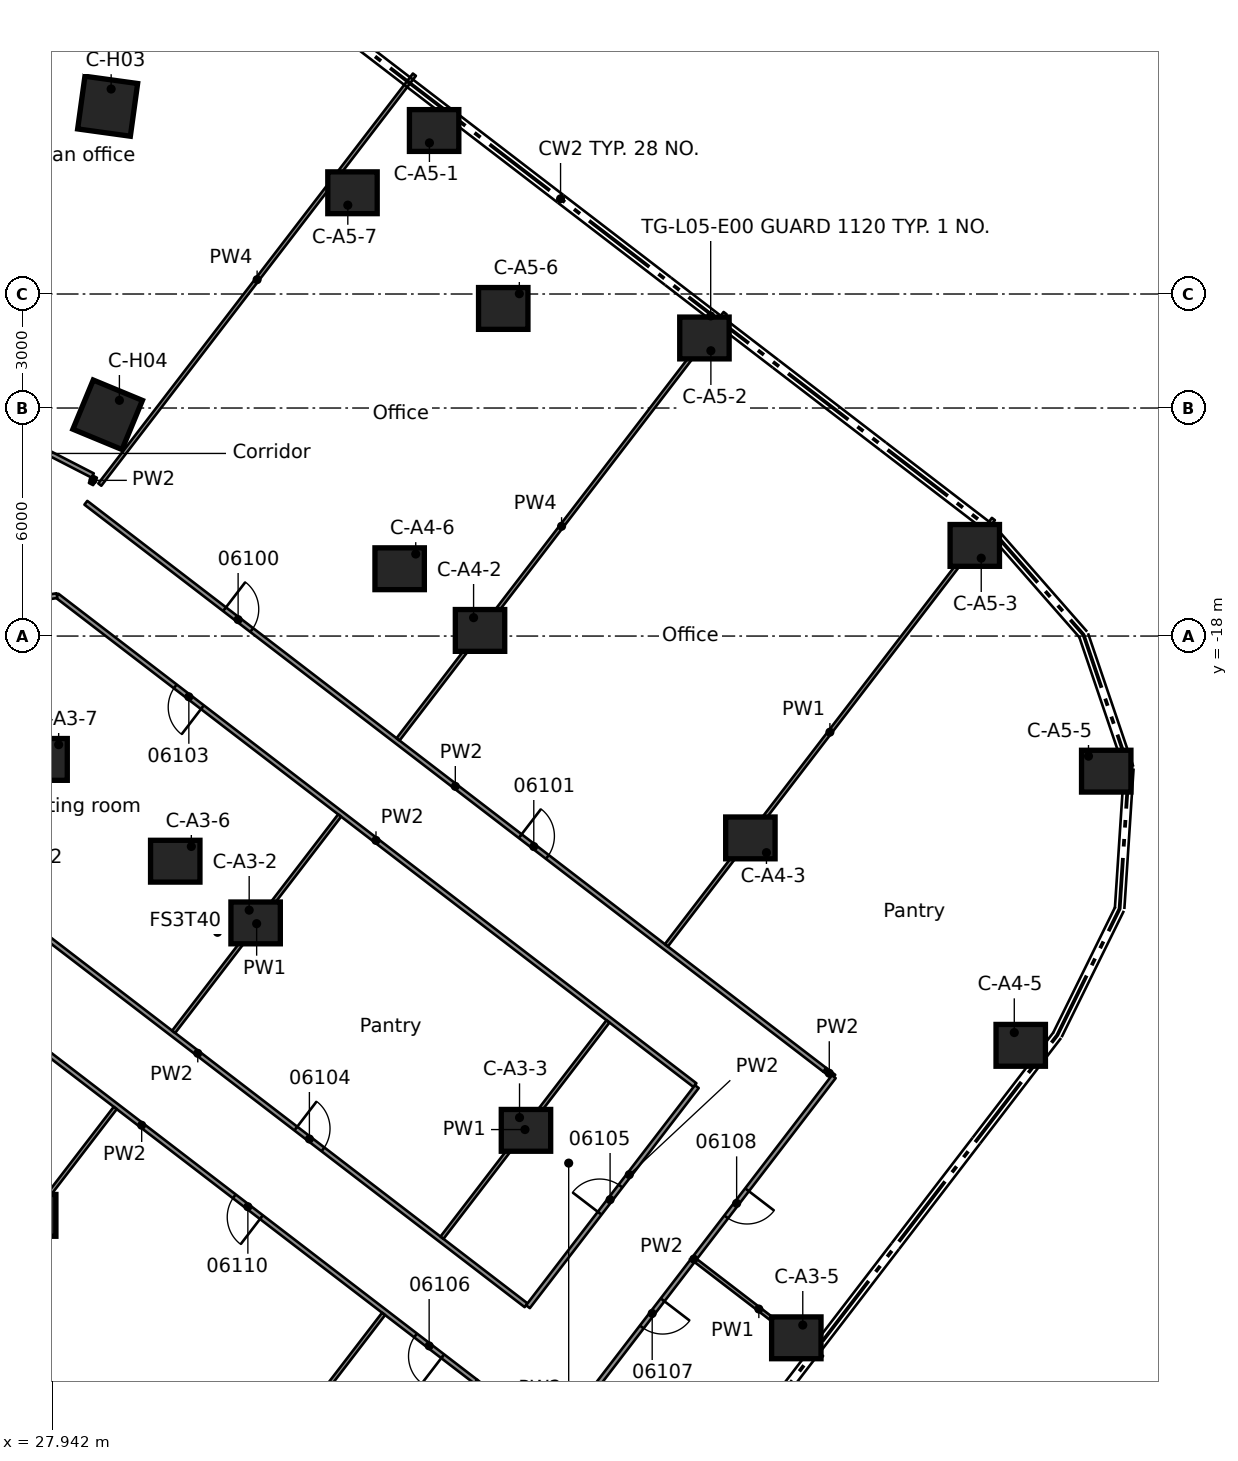
"""IFC4 building model, lengths in metres.
Left out: names, types, materials, properties, quantities, classifications, styles, units other than length and angle.
Written with IfcOpenShell. Run it as: python <this file> out.ifc"""

import sys

from ifc_helpers import new_model, si_unit, direction, frame, frame_2d, origin, origin_2d, place, context, subcontext, project, spatial, rectangle, extrude, element, fill, save


model = new_model("IFC4")
c1 = context("Model", 3, precision=1e-05, world=origin(), true_north=direction((0.0, 1.0)))
c2 = subcontext(c1, "Body", "Model", "MODEL_VIEW")
j1 = project(units=[si_unit("LENGTHUNIT", "METRE"), si_unit("PLANEANGLEUNIT", "RADIAN")], contexts=[c1])
p1 = place(None, origin())
s1 = spatial("IfcSite", under=j1, at=p1, CompositionType="ELEMENT")
p2 = place(p1, origin())
s2 = spatial("IfcBuilding", under=s1, at=p2, CompositionType="ELEMENT")
p3 = place(p2, frame((0.0, 0.0, 29.2)))
s3 = spatial("IfcBuildingStorey", under=s2, at=p3, CompositionType="ELEMENT", Elevation=29.2)
for number, where, z_axis, x_axis in (
    (1, (27.389, -33.243, 0.0), (0.0, 0.0, 1.0), (1.0, 0.0, 0.0)),
    (2, (33.294, -25.548, 0.0), (0.0, 0.0, 1.0), (1.0, 0.0, 0.0)),
    (3, (40.408, -31.006, 0.0), (0.0, 0.0, 1.0), (1.0, 0.0, 0.0)),
    (4, (47.522, -36.465, 0.0), (0.0, 0.0, 1.0), (1.0, 0.0, 0.0)),
    (5, (31.179, -23.924, 0.0), (0.0, 0.0, 1.0), (1.0, 0.0, 0.0)),
    (6, (27.688, -21.246, 0.0), (0.0, 0.0, 1.0), (1.0, 0.0, 0.0)),
    (7, (39.199, -17.852, 0.0), (0.0, 0.0, 1.0), (1.0, 0.0, 0.0)),
    (8, (46.313, -23.311, 0.0), (0.0, 0.0, 1.0), (1.0, 0.0, 0.0)),
    (9, (53.427, -28.769, 0.0), (0.0, 0.0, 1.0), (1.0, 0.0, 0.0)),
    (10, (37.084, -16.229, 0.0), (0.0, 0.0, 1.0), (1.0, 0.0, 0.0)),
    (11, (37.991, -4.698, 0.0), (0.0, 0.0, 1.0), (1.0, 0.0, 0.0)),
    (12, (45.104, -10.157, 0.0), (0.0, 0.0, 1.0), (1.0, 0.0, 0.0)),
    (13, (52.218, -15.615, 0.0), (0.0, 0.0, 1.0), (1.0, 0.0, 0.0)),
    (14, (55.677, -21.555, 0.0), (0.0, 0.0, 1.0), (1.0, 0.0, 0.0)),
    (15, (39.81, -9.38, 0.0), (0.0, 0.0, 1.0), (1.0, 0.0, 0.0)),
    (16, (35.843, -6.336, 0.0), (0.0, 0.0, 1.0), (1.0, 0.0, 0.0)),
):
    element("IfcColumn", number, at=place(p3, frame(where, z_axis=z_axis, x_axis=x_axis)), inside=s3, PredefinedType="COLUMN", context=c2, shape_type="SweptSolid", body=[
        extrude(rectangle(XDim=1.3, YDim=1.1, at=origin_2d()), origin(), (0.0, 0.0, 1.0), 4.1),
    ])
for number, where, z_axis, x_axis in (
    (17, (29.4, -4.059, 0.0), (0.0, 0.0, 1.0), (0.991, -0.137, 0.0)),
    (18, (29.4, -12.178, 0.0), (0.0, 0.0, 1.0), (0.924, -0.383, 0.0)),
):
    element("IfcColumn", number, at=place(p3, frame(where, z_axis=z_axis, x_axis=x_axis)), inside=s3, PredefinedType="COLUMN", context=c2, shape_type="SweptSolid", body=[
        extrude(rectangle(XDim=1.4, YDim=1.4, at=origin_2d()), origin(), (0.0, 0.0, 1.0), 4.1),
    ])
p4 = place(p3, frame((48.27, -29.412, 0.0), z_axis=(0.0, 0.0, 1.0), x_axis=(0.793016893484, -0.609199644328, 0.0)))
e19 = element("IfcWall", 19, at=p4, inside=s3, PredefinedType="PARTITIONING", context=c2, shape_type="SweptSolid", body=[
    extrude(rectangle(XDim=0.3, YDim=0.125, at=frame_2d((0.15, 0.0))), origin(), (0.0, 0.0, 1.0), 3.66),
])
p5 = place(p3, frame((39.09, -37.62, 0.0), z_axis=(0.0, 0.0, 1.0), x_axis=(-0.793364364442, 0.608747061786, 0.0)))
e20 = element("IfcWall", 20, at=p5, inside=s3, PredefinedType="PARTITIONING", context=c2, shape_type="SweptSolid", body=[
    extrude(rectangle(XDim=22.17, YDim=0.125, at=frame_2d((11.085, 0.0))), origin(), (0.0, 0.0, 1.0), 3.66),
])
p6 = place(p5, frame((1.1, 0.0, 0.0)))
e21 = element("IfcOpeningElement", 21, at=p6, cuts=e20, PredefinedType="OPENING", context=c2, shape_type="SweptSolid", body=[
    extrude(rectangle(XDim=0.9, YDim=2.1, at=frame_2d((0.45, 1.05))), frame((0.0, 0.073, 0.0), z_axis=(0.0, -1.0, 0.0), x_axis=(1.0, 0.0, 0.0)), (0.0, 0.0, 1.0), 0.145),
])
p7 = place(p5, frame((16.263, 0.0, 0.0)))
e22 = element("IfcOpeningElement", 22, at=p7, cuts=e20, PredefinedType="OPENING", context=c2, shape_type="SweptSolid", body=[
    extrude(rectangle(XDim=1.8, YDim=2.1, at=frame_2d((0.9, 1.05))), frame((0.0, 0.073, 0.0), z_axis=(0.0, -1.0, 0.0), x_axis=(1.0, 0.0, 0.0)), (0.0, 0.0, 1.0), 0.145),
])
p8 = place(p5, frame((7.113, 0.0, 0.0)))
e23 = element("IfcOpeningElement", 23, at=p8, cuts=e20, PredefinedType="OPENING", context=c2, shape_type="SweptSolid", body=[
    extrude(rectangle(XDim=0.9, YDim=2.1, at=frame_2d((0.45, 1.05))), frame((0.0, 0.073, 0.0), z_axis=(0.0, -1.0, 0.0), x_axis=(1.0, 0.0, 0.0)), (0.0, 0.0, 1.0), 0.145),
])
p9 = place(p3, frame((39.089, -37.62, 0.0), z_axis=(0.0, 0.0, 1.0), x_axis=(0.793216962218, -0.608939119166, 0.0)))
e24 = element("IfcWall", 24, at=p9, inside=s3, PredefinedType="PARTITIONING", context=c2, shape_type="SweptSolid", body=[
    extrude(rectangle(XDim=2.524, YDim=0.125, at=frame_2d((1.262, 0.0))), origin(), (0.0, 0.0, 1.0), 3.66),
])
p10 = place(p3, frame((23.132, -22.35, 0.0), z_axis=(0.0, 0.0, 1.0), x_axis=(0.79336850047, -0.60874167137, 0.0)))
e25 = element("IfcWall", 25, at=p10, inside=s3, PredefinedType="PARTITIONING", context=c2, shape_type="SweptSolid", body=[
    extrude(rectangle(XDim=21.779, YDim=0.125, at=frame_2d((10.89, 0.0))), origin(), (0.0, 0.0, 1.0), 3.66),
])
p11 = place(p10, frame((4.6, 0.0, 0.0)))
e26 = element("IfcOpeningElement", 26, at=p11, cuts=e25, PredefinedType="OPENING", context=c2, shape_type="SweptSolid", body=[
    extrude(rectangle(XDim=0.9, YDim=2.1, at=frame_2d((0.45, 1.05))), frame((0.0, 0.073, 0.0), z_axis=(0.0, -1.0, 0.0), x_axis=(1.0, 0.0, 0.0)), (0.0, 0.0, 1.0), 0.145),
])
p12 = place(p10, frame((14.142, 0.0, 0.0)))
e27 = element("IfcOpeningElement", 27, at=p12, cuts=e25, PredefinedType="OPENING", context=c2, shape_type="SweptSolid", body=[
    extrude(rectangle(XDim=0.9, YDim=2.1, at=frame_2d((0.45, 1.05))), frame((0.0, 0.073, 0.0), z_axis=(0.0, -1.0, 0.0), x_axis=(1.0, 0.0, 0.0)), (0.0, 0.0, 1.0), 0.145),
])
p13 = place(p3, frame((44.875, -34.433, 0.0), z_axis=(0.0, 0.0, 1.0), x_axis=(0.793295570217, -0.60883670904, 0.0)))
e28 = element("IfcWall", 28, at=p13, inside=s3, PredefinedType="PARTITIONING", context=c2, shape_type="SweptSolid", body=[
    extrude(rectangle(XDim=4.186, YDim=0.1, at=frame_2d((2.093, 0.0))), origin(), (0.0, 0.0, 1.0), 3.66),
])
p14 = place(p3, frame((44.855, -29.817, 0.0), z_axis=(0.0, 0.0, 1.0), x_axis=(-0.793378264443, 0.608728945844, 0.0)))
e29 = element("IfcWall", 29, at=p14, inside=s3, PredefinedType="PARTITIONING", context=c2, shape_type="SweptSolid", body=[
    extrude(rectangle(XDim=21.16, YDim=0.125, at=frame_2d((10.58, 0.0))), origin(), (0.0, 0.0, 1.0), 3.66),
])
p15 = place(p14, frame((16.337, 0.0, 0.0)))
e30 = element("IfcOpeningElement", 30, at=p15, cuts=e29, PredefinedType="OPENING", context=c2, shape_type="SweptSolid", body=[
    extrude(rectangle(XDim=0.9, YDim=2.1, at=frame_2d((0.45, 1.05))), frame((0.0, 0.073, 0.0), z_axis=(0.0, -1.0, 0.0), x_axis=(1.0, 0.0, 0.0)), (0.0, 0.0, 1.0), 0.145),
])
p16 = place(p3, frame((28.827, -14.493, 0.0), z_axis=(0.0, 0.0, 1.0), x_axis=(0.793315591759, -0.608810620695, 0.0)))
e31 = element("IfcWall", 31, at=p16, inside=s3, PredefinedType="PARTITIONING", context=c2, shape_type="SweptSolid", body=[
    extrude(rectangle(XDim=24.509, YDim=0.125, at=frame_2d((12.254, 0.0))), origin(), (0.0, 0.0, 1.0), 3.66),
])
p17 = place(p16, frame((4.6, 0.0, 0.0)))
e32 = element("IfcOpeningElement", 32, at=p17, cuts=e31, PredefinedType="OPENING", context=c2, shape_type="SweptSolid", body=[
    extrude(rectangle(XDim=0.9, YDim=2.1, at=frame_2d((0.45, 1.05))), frame((0.0, 0.073, 0.0), z_axis=(0.0, -1.0, 0.0), x_axis=(1.0, 0.0, 0.0)), (0.0, 0.0, 1.0), 0.145),
])
p18 = place(p16, frame((14.407, 0.0, 0.0)))
e33 = element("IfcOpeningElement", 33, at=p18, cuts=e31, PredefinedType="OPENING", context=c2, shape_type="SweptSolid", body=[
    extrude(rectangle(XDim=0.9, YDim=2.1, at=frame_2d((0.45, 1.05))), frame((0.0, 0.073, 0.0), z_axis=(0.0, -1.0, 0.0), x_axis=(1.0, 0.0, 0.0)), (0.0, 0.0, 1.0), 0.145),
])
p19 = place(p3, frame((21.541, -9.94, 0.0), z_axis=(0.0, 0.0, 1.0), x_axis=(0.889469569246, -0.456994404107, 0.0)))
e34 = element("IfcWall", 34, at=p19, inside=s3, PredefinedType="PARTITIONING", context=c2, shape_type="SweptSolid", body=[
    extrude(rectangle(XDim=8.394, YDim=0.125, at=frame_2d((4.197, 0.0))), origin(), (0.0, 0.0, 1.0), 3.66),
])
p20 = place(p3, frame((48.508, -29.595, 0.0), z_axis=(0.0, 0.0, 1.0), x_axis=(-0.608738166201, -0.793371189929, 0.0)))
e35 = element("IfcWall", 35, at=p20, inside=s3, PredefinedType="PARTITIONING", context=c2, shape_type="SweptSolid", body=[
    extrude(rectangle(XDim=12.1, YDim=0.125, at=frame_2d((6.05, 0.0))), origin(), (0.0, 0.0, 1.0), 3.66),
])
p21 = place(p20, frame((7.4, 0.0, 0.0)))
e36 = element("IfcOpeningElement", 36, at=p21, cuts=e35, PredefinedType="OPENING", context=c2, shape_type="SweptSolid", body=[
    extrude(rectangle(XDim=0.9, YDim=2.1, at=frame_2d((0.45, 1.05))), frame((0.0, 0.073, 0.0), z_axis=(0.0, -1.0, 0.0), x_axis=(1.0, 0.0, 0.0)), (0.0, 0.0, 1.0), 0.145),
])
p22 = place(p20, frame((3.75, 0.0, 0.0)))
e37 = element("IfcOpeningElement", 37, at=p22, cuts=e35, PredefinedType="OPENING", context=c2, shape_type="SweptSolid", body=[
    extrude(rectangle(XDim=0.9, YDim=2.1, at=frame_2d((0.45, 1.05))), frame((0.0, 0.073, 0.0), z_axis=(0.0, -1.0, 0.0), x_axis=(1.0, 0.0, 0.0)), (0.0, 0.0, 1.0), 0.145),
])
p23 = place(p3, frame((40.46, -35.646, 0.0), z_axis=(0.0, 0.0, 1.0), x_axis=(0.608868228501, 0.793271378736, 0.0)))
e38 = element("IfcWall", 38, at=p23, inside=s3, PredefinedType="PARTITIONING", context=c2, shape_type="SweptSolid", body=[
    extrude(rectangle(XDim=7.299, YDim=0.125, at=frame_2d((3.649, 0.0))), origin(), (0.0, 0.0, 1.0), 3.66),
])
p24 = place(p23, frame((3.1, 0.0, 0.0)))
e39 = element("IfcOpeningElement", 39, at=p24, cuts=e38, PredefinedType="OPENING", context=c2, shape_type="SweptSolid", body=[
    extrude(rectangle(XDim=0.9, YDim=2.1, at=frame_2d((0.45, 1.05))), frame((0.0, 0.073, 0.0), z_axis=(0.0, -1.0, 0.0), x_axis=(1.0, 0.0, 0.0)), (0.0, 0.0, 1.0), 0.145),
])
p25 = place(p3, frame((28.054, -47.051, 0.0), z_axis=(0.0, 0.0, 1.0), x_axis=(0.608819037892, 0.793309132117, 0.0)))
e40 = element("IfcWall", 40, at=p25, inside=s3, PredefinedType="PARTITIONING", context=c2, shape_type="SweptSolid", body=[
    extrude(rectangle(XDim=14.137, YDim=0.1, at=frame_2d((7.069, 0.0))), origin(), (0.0, 0.0, 1.0), 3.66),
])
p26 = place(p3, frame((38.198, -33.831, 0.0), z_axis=(0.0, 0.0, 1.0), x_axis=(0.60875801413, 0.793355960608, 0.0)))
e41 = element("IfcWall", 41, at=p26, inside=s3, PredefinedType="PARTITIONING", context=c2, shape_type="SweptSolid", body=[
    extrude(rectangle(XDim=7.174, YDim=0.1, at=frame_2d((3.587, 0.0))), origin(), (0.0, 0.0, 1.0), 3.66),
])
p27 = place(p3, frame((44.103, -26.136, 0.0), z_axis=(0.0, 0.0, 1.0), x_axis=(0.608732079898, 0.793375859793, 0.0)))
e42 = element("IfcWall", 42, at=p27, inside=s3, PredefinedType="PARTITIONING", context=c2, shape_type="SweptSolid", body=[
    extrude(rectangle(XDim=14.136, YDim=0.1, at=frame_2d((7.068, 0.0))), origin(), (0.0, 0.0, 1.0), 3.66),
])
p28 = place(p3, frame((20.993, -41.633, 0.0), z_axis=(0.0, 0.0, 1.0), x_axis=(0.608829906099, 0.793300791277, 0.0)))
e43 = element("IfcWall", 43, at=p28, inside=s3, PredefinedType="PARTITIONING", context=c2, shape_type="SweptSolid", body=[
    extrude(rectangle(XDim=14.137, YDim=0.1, at=frame_2d((7.069, 0.0))), origin(), (0.0, 0.0, 1.0), 3.66),
])
p29 = place(p3, frame((31.137, -28.413, 0.0), z_axis=(0.0, 0.0, 1.0), x_axis=(0.608843688194, 0.793290213822, 0.0)))
e44 = element("IfcWall", 44, at=p29, inside=s3, PredefinedType="PARTITIONING", context=c2, shape_type="SweptSolid", body=[
    extrude(rectangle(XDim=7.174, YDim=0.1, at=frame_2d((3.587, 0.0))), origin(), (0.0, 0.0, 1.0), 3.66),
])
p30 = place(p3, frame((37.042, -20.718, 0.0), z_axis=(0.0, 0.0, 1.0), x_axis=(0.608775561638, 0.793342495743, 0.0)))
e45 = element("IfcWall", 45, at=p30, inside=s3, PredefinedType="PARTITIONING", context=c2, shape_type="SweptSolid", body=[
    extrude(rectangle(XDim=14.136, YDim=0.1, at=frame_2d((7.068, 0.0))), origin(), (0.0, 0.0, 1.0), 3.025),
])
p31 = place(p3, frame((29.194, -14.015, 0.0), z_axis=(0.0, 0.0, 1.0), x_axis=(0.608832188233, 0.793299039815, 0.0)))
e46 = element("IfcWall", 46, at=p31, inside=s3, PredefinedType="PARTITIONING", context=c2, shape_type="SweptSolid", body=[
    extrude(rectangle(XDim=13.596, YDim=0.1, at=frame_2d((6.798, 0.0))), origin(), (0.0, 0.0, 1.0), 3.025),
])
p32 = place(p3, frame((28.962, -14.0, 0.0), z_axis=(0.0, 0.0, 1.0), x_axis=(0.458358127557, 0.8887675888, 0.0)))
e47 = element("IfcWall", 47, at=p32, inside=s3, PredefinedType="PARTITIONING", context=c2, shape_type="SweptSolid", body=[
    extrude(rectangle(XDim=0.218, YDim=0.125, at=frame_2d((0.109, 0.0))), origin(), (0.0, 0.0, 1.0), 3.66),
])
p33 = place(p3, frame((27.132, -17.087, 0.0), z_axis=(0.0, 0.0, 1.0), x_axis=(0.987224118301, 0.159337817997, 0.0)))
e48 = element("IfcWall", 48, at=p33, inside=s3, PredefinedType="PARTITIONING", context=c2, shape_type="SweptSolid", body=[
    extrude(rectangle(XDim=0.947, YDim=0.125, at=frame_2d((0.474, 0.0))), origin(), (0.0, 0.0, 1.0), 3.66),
])
p34 = place(p17, origin())
e49 = element("IfcDoor", 49, at=p34, inside=s3, OperationType="SINGLE_SWING_LEFT", PredefinedType="DOOR", context=c2, shape_type="SweptSolid", body=[
    extrude(rectangle(XDim=0.9, YDim=2.1, at=frame_2d((0.45, 1.05))), frame((0.0, 0.025, 0.0), z_axis=(0.0, -1.0, 0.0), x_axis=(1.0, 0.0, 0.0)), (0.0, 0.0, 1.0), 0.05),
])
fill(e32, e49)
p35 = place(p18, origin())
e50 = element("IfcDoor", 50, at=p35, inside=s3, OperationType="SINGLE_SWING_RIGHT", PredefinedType="DOOR", context=c2, shape_type="SweptSolid", body=[
    extrude(rectangle(XDim=0.9, YDim=2.1, at=frame_2d((0.45, 1.05))), frame((0.0, 0.025, 0.0), z_axis=(0.0, -1.0, 0.0), x_axis=(1.0, 0.0, 0.0)), (0.0, 0.0, 1.0), 0.05),
])
fill(e33, e50)
p36 = place(p15, origin())
e51 = element("IfcDoor", 51, at=p36, inside=s3, OperationType="SINGLE_SWING_RIGHT", PredefinedType="DOOR", context=c2, shape_type="SweptSolid", body=[
    extrude(rectangle(XDim=0.9, YDim=2.1, at=frame_2d((0.45, 1.05))), frame((0.0, 0.025, 0.0), z_axis=(0.0, -1.0, 0.0), x_axis=(1.0, 0.0, 0.0)), (0.0, 0.0, 1.0), 0.05),
])
fill(e30, e51)
p37 = place(p12, origin())
e52 = element("IfcDoor", 52, at=p37, inside=s3, OperationType="SINGLE_SWING_RIGHT", PredefinedType="DOOR", context=c2, shape_type="SweptSolid", body=[
    extrude(rectangle(XDim=0.9, YDim=2.1, at=frame_2d((0.45, 1.05))), frame((0.0, 0.025, 0.0), z_axis=(0.0, -1.0, 0.0), x_axis=(1.0, 0.0, 0.0)), (0.0, 0.0, 1.0), 0.05),
])
fill(e27, e52)
p38 = place(p24, origin())
e53 = element("IfcDoor", 53, at=p38, inside=s3, OperationType="SINGLE_SWING_LEFT", PredefinedType="DOOR", context=c2, shape_type="SweptSolid", body=[
    extrude(rectangle(XDim=0.9, YDim=2.1, at=frame_2d((0.45, 1.05))), frame((0.0, 0.025, 0.0), z_axis=(0.0, -1.0, 0.0), x_axis=(1.0, 0.0, 0.0)), (0.0, 0.0, 1.0), 0.05),
])
fill(e39, e53)
p39 = place(p6, origin())
e54 = element("IfcDoor", 54, at=p39, inside=s3, OperationType="SINGLE_SWING_LEFT", PredefinedType="DOOR", context=c2, shape_type="SweptSolid", body=[
    extrude(rectangle(XDim=0.9, YDim=2.1, at=frame_2d((0.45, 1.05))), frame((0.0, 0.025, 0.0), z_axis=(0.0, -1.0, 0.0), x_axis=(1.0, 0.0, 0.0)), (0.0, 0.0, 1.0), 0.05),
])
fill(e21, e54)
p40 = place(p21, origin())
e55 = element("IfcDoor", 55, at=p40, inside=s3, OperationType="SINGLE_SWING_RIGHT", PredefinedType="DOOR", context=c2, shape_type="SweptSolid", body=[
    extrude(rectangle(XDim=0.9, YDim=2.1, at=frame_2d((0.45, 1.05))), frame((0.0, 0.025, 0.0), z_axis=(0.0, -1.0, 0.0), x_axis=(1.0, 0.0, 0.0)), (0.0, 0.0, 1.0), 0.05),
])
fill(e36, e55)
p41 = place(p22, origin())
e56 = element("IfcDoor", 56, at=p41, inside=s3, OperationType="SINGLE_SWING_LEFT", PredefinedType="DOOR", context=c2, shape_type="SweptSolid", body=[
    extrude(rectangle(XDim=0.9, YDim=2.1, at=frame_2d((0.45, 1.05))), frame((0.0, 0.025, 0.0), z_axis=(0.0, -1.0, 0.0), x_axis=(1.0, 0.0, 0.0)), (0.0, 0.0, 1.0), 0.05),
])
fill(e37, e56)
p42 = place(p8, origin())
e57 = element("IfcDoor", 57, at=p42, inside=s3, OperationType="SINGLE_SWING_LEFT", PredefinedType="DOOR", context=c2, shape_type="SweptSolid", body=[
    extrude(rectangle(XDim=0.9, YDim=2.1, at=frame_2d((0.45, 1.05))), frame((0.0, 0.025, 0.0), z_axis=(0.0, -1.0, 0.0), x_axis=(1.0, 0.0, 0.0)), (0.0, 0.0, 1.0), 0.05),
])
fill(e23, e57)
save(model, sys.argv[1])
